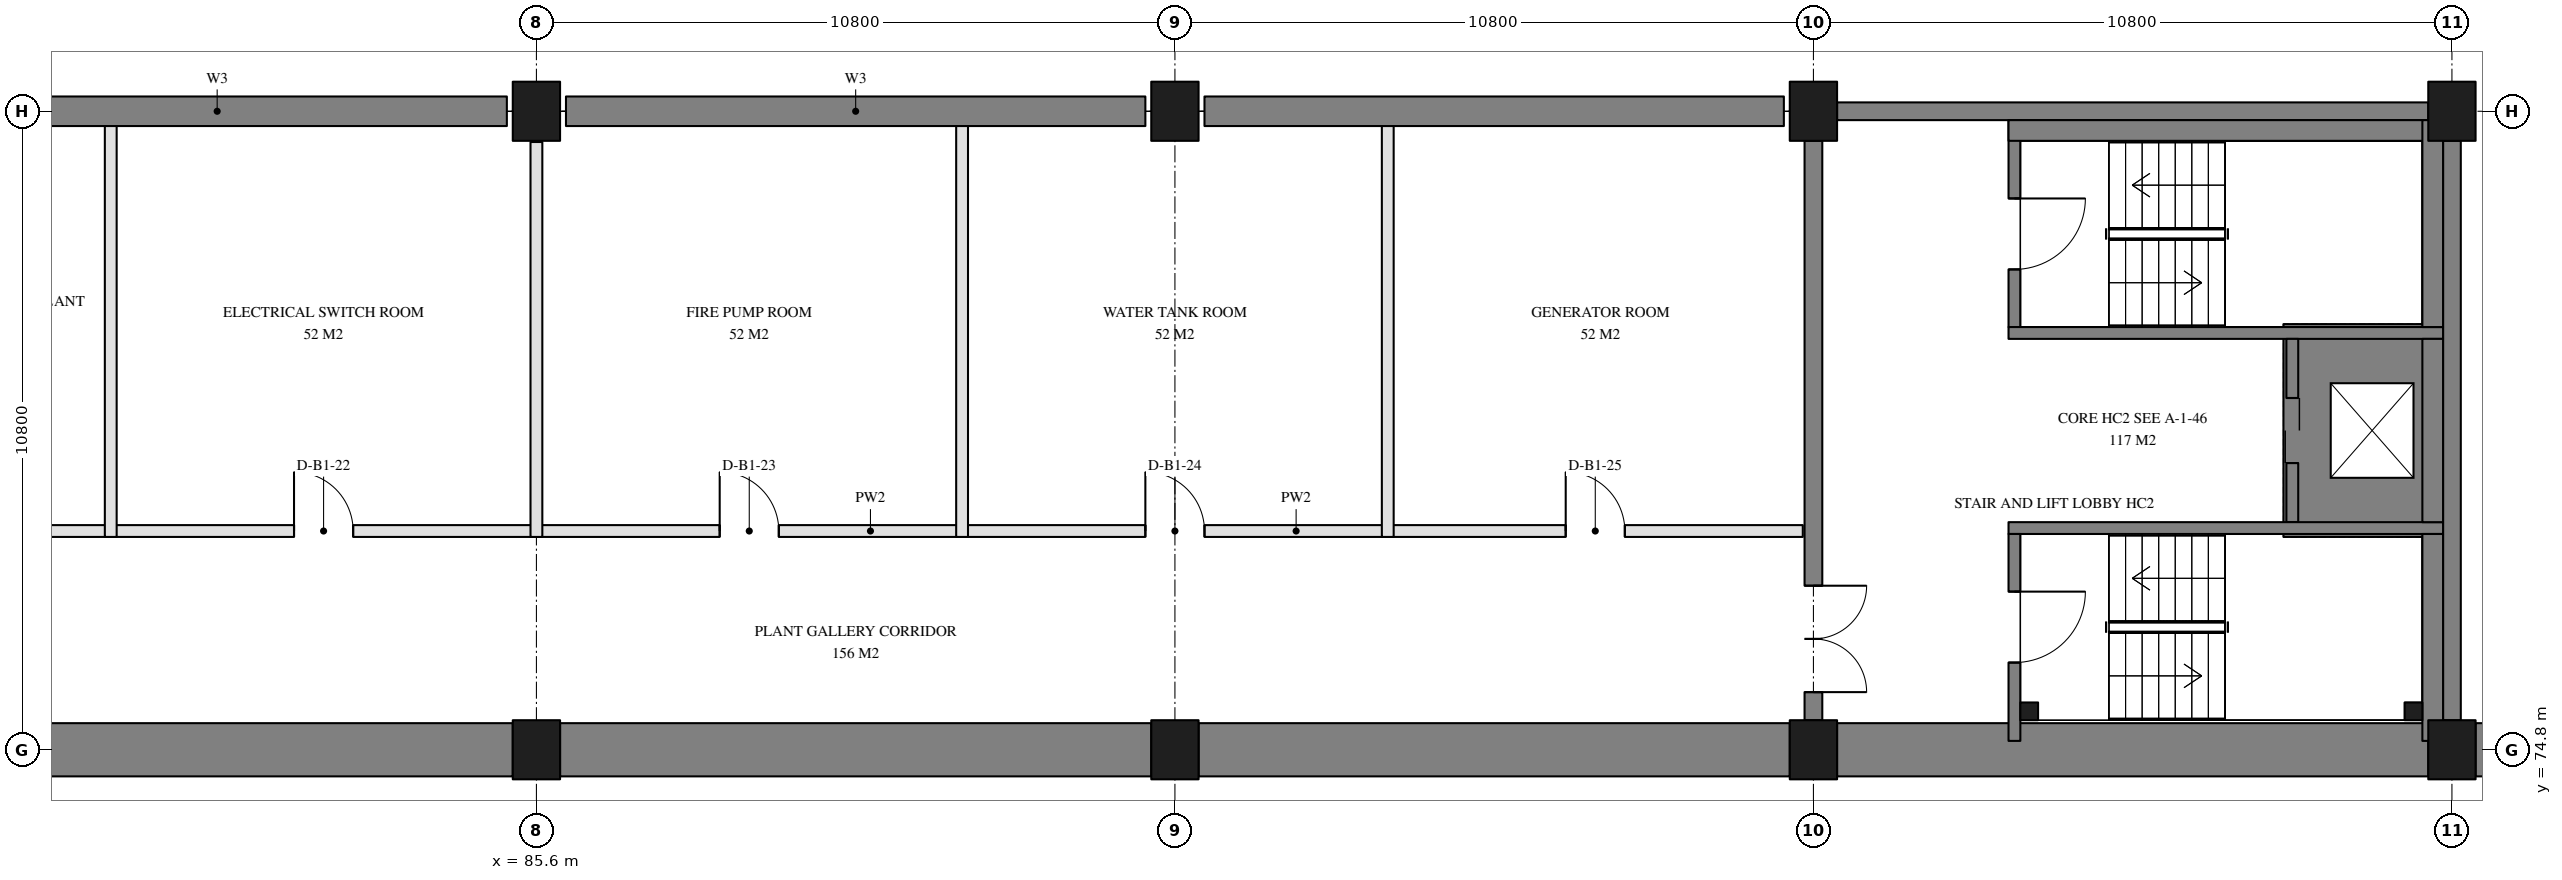
"""IFC4 building model, lengths in metres.
Left out: names, types, materials, properties, quantities, classifications, styles, units other than length and angle.
Written with IfcOpenShell. Run it as: python <this file> out.ifc"""

import sys

from ifc_helpers import new_model, si_unit, direction, frame, frame_2d, origin, origin_2d, place, context, subcontext, project, spatial, polyline, rectangle, outline, extrude, element, fill, save


model = new_model("IFC4")
c1 = context("Model", 3, precision=1e-05, world=origin(), true_north=direction((0.0, 1.0)))
c2 = subcontext(c1, "Body", "Model", "MODEL_VIEW")
j1 = project(units=[si_unit("LENGTHUNIT", "METRE"), si_unit("PLANEANGLEUNIT", "RADIAN")], contexts=[c1])
p1 = place(None, origin())
s1 = spatial("IfcSite", under=j1, at=p1, CompositionType="ELEMENT")
p2 = place(p1, origin())
s2 = spatial("IfcBuilding", under=s1, at=p2, CompositionType="ELEMENT")
p3 = place(p2, frame((0.0, 0.0, -5.4)))
s3 = spatial("IfcBuildingStorey", under=s2, at=p3, CompositionType="ELEMENT", Elevation=-5.4)
p4 = place(p3, frame((85.6, 74.8, 0.0), z_axis=(0.0, 0.0, 1.0), x_axis=(1.0, 0.0, 0.0)))
e1 = element("IfcColumn", 1, at=p4, inside=s3, PredefinedType="COLUMN", context=c2, shape_type="SweptSolid", body=[
    extrude(rectangle(XDim=0.8, YDim=1.0, at=origin_2d()), origin(), (0.0, 0.0, 1.0), 5.4),
])
p5 = place(p3, frame((85.6, 85.6, -0.4), z_axis=(0.0, 0.0, 1.0), x_axis=(1.0, 0.0, 0.0)))
e2 = element("IfcColumn", 2, at=p5, inside=s3, PredefinedType="COLUMN", context=c2, shape_type="SweptSolid", body=[
    extrude(rectangle(XDim=0.8, YDim=1.0, at=origin_2d()), origin(), (0.0, 0.0, 1.0), 5.8),
])
p6 = place(p3, frame((96.4, 74.8, 0.0), z_axis=(0.0, 0.0, 1.0), x_axis=(1.0, 0.0, 0.0)))
e3 = element("IfcColumn", 3, at=p6, inside=s3, PredefinedType="COLUMN", context=c2, shape_type="SweptSolid", body=[
    extrude(rectangle(XDim=0.8, YDim=1.0, at=origin_2d()), origin(), (0.0, 0.0, 1.0), 5.4),
])
p7 = place(p3, frame((96.4, 85.6, -0.4), z_axis=(0.0, 0.0, 1.0), x_axis=(1.0, 0.0, 0.0)))
e4 = element("IfcColumn", 4, at=p7, inside=s3, PredefinedType="COLUMN", context=c2, shape_type="SweptSolid", body=[
    extrude(rectangle(XDim=0.8, YDim=1.0, at=origin_2d()), origin(), (0.0, 0.0, 1.0), 5.8),
])
p8 = place(p3, frame((107.2, 74.8, 0.0), z_axis=(0.0, 0.0, 1.0), x_axis=(1.0, 0.0, 0.0)))
e5 = element("IfcColumn", 5, at=p8, inside=s3, PredefinedType="COLUMN", context=c2, shape_type="SweptSolid", body=[
    extrude(rectangle(XDim=0.8, YDim=1.0, at=origin_2d()), origin(), (0.0, 0.0, 1.0), 5.4),
])
p9 = place(p3, frame((107.2, 85.6, -0.4), z_axis=(0.0, 0.0, 1.0), x_axis=(1.0, 0.0, 0.0)))
e6 = element("IfcColumn", 6, at=p9, inside=s3, PredefinedType="COLUMN", context=c2, shape_type="SweptSolid", body=[
    extrude(rectangle(XDim=0.8, YDim=1.0, at=origin_2d()), origin(), (0.0, 0.0, 1.0), 5.8),
])
p10 = place(p3, frame((118.0, 74.8, 0.0), z_axis=(0.0, 0.0, 1.0), x_axis=(1.0, 0.0, 0.0)))
e7 = element("IfcColumn", 7, at=p10, inside=s3, PredefinedType="COLUMN", context=c2, shape_type="SweptSolid", body=[
    extrude(rectangle(XDim=0.8, YDim=1.0, at=origin_2d()), origin(), (0.0, 0.0, 1.0), 5.4),
])
p11 = place(p3, frame((118.0, 85.6, -0.4), z_axis=(0.0, 0.0, 1.0), x_axis=(1.0, 0.0, 0.0)))
e8 = element("IfcColumn", 8, at=p11, inside=s3, PredefinedType="COLUMN", context=c2, shape_type="SweptSolid", body=[
    extrude(rectangle(XDim=0.8, YDim=1.0, at=origin_2d()), origin(), (0.0, 0.0, 1.0), 5.8),
])
p12 = place(p3, frame((0.0, 0.0, -1.4)))
e9 = element("IfcWall", 9, at=p12, inside=s3, PredefinedType="SOLIDWALL", context=c2, shape_type="SweptSolid", body=[
    extrude(outline(polyline([(115.15, 82.0), (115.15, 78.4), (117.75, 78.4), (117.75, 82.0), (115.15, 82.0)]), holes=[polyline([(115.4, 78.65), (117.5, 78.65), (117.5, 81.75), (115.4, 81.75), (115.4, 78.65)])]), origin(), (0.0, 0.0, 1.0), 1.4),
])
p13 = place(p3, frame((183.25, 74.8, 0.0), z_axis=(0.0, 0.0, 1.0), x_axis=(-1.0, 0.0, 0.0)))
e10 = element("IfcWall", 10, at=p13, inside=s3, PredefinedType="SOLIDWALL", context=c2, shape_type="SweptSolid", body=[
    extrude(rectangle(XDim=64.85, YDim=0.9, at=frame_2d((32.425, 0.0))), origin(), (0.0, 0.0, 1.0), 4.8),
])
for number, where, z_axis, x_axis in (
    (11, (117.6, 74.8, 0.0), (0.0, 0.0, 1.0), (-1.0, 0.0, 0.0)),
    (12, (106.8, 74.8, 0.0), (0.0, 0.0, 1.0), (-1.0, 0.0, 0.0)),
    (13, (96.0, 74.8, 0.0), (0.0, 0.0, 1.0), (-1.0, 0.0, 0.0)),
    (14, (85.2, 74.8, 0.0), (0.0, 0.0, 1.0), (-1.0, 0.0, 0.0)),
):
    element("IfcWall", number, at=place(p3, frame(where, z_axis=z_axis, x_axis=x_axis)), inside=s3, PredefinedType="SOLIDWALL", context=c2, shape_type="SweptSolid", body=[
        extrude(rectangle(XDim=10.0, YDim=0.9, at=frame_2d((5.0, 0.0))), origin(), (0.0, 0.0, 1.0), 4.8),
    ])
p14 = place(p3, frame((118.0, 75.3, 0.0), z_axis=(0.0, 0.0, 1.0), x_axis=(0.0, 1.0, 0.0)))
e15 = element("IfcWall", 15, at=p14, inside=s3, PredefinedType="SOLIDWALL", context=c2, shape_type="SweptSolid", body=[
    extrude(rectangle(XDim=9.8, YDim=0.3, at=frame_2d((4.9, 0.0))), origin(), (0.0, 0.0, 1.0), 5.4),
])
p15 = place(p3, frame((117.6, 85.6, 0.0), z_axis=(0.0, 0.0, 1.0), x_axis=(-1.0, 0.0, 0.0)))
e16 = element("IfcWall", 16, at=p15, inside=s3, PredefinedType="SOLIDWALL", context=c2, shape_type="SweptSolid", body=[
    extrude(rectangle(XDim=10.0, YDim=0.3, at=frame_2d((5.0, 0.0))), origin(), (0.0, 0.0, 1.0), 5.4),
])
p16 = place(p3, frame((107.2, 85.1, 0.0), z_axis=(0.0, 0.0, 1.0), x_axis=(0.0, -1.0, 0.0)))
e17 = element("IfcWall", 17, at=p16, inside=s3, PredefinedType="SOLIDWALL", context=c2, shape_type="SweptSolid", body=[
    extrude(rectangle(XDim=9.8, YDim=0.3, at=frame_2d((4.9, 0.0))), origin(), (0.0, 0.0, 1.0), 5.4),
])
p17 = place(p16, frame((7.525, 0.0, 0.0)))
e18 = element("IfcOpeningElement", 18, at=p17, cuts=e17, PredefinedType="OPENING", context=c2, shape_type="SweptSolid", body=[
    extrude(rectangle(XDim=1.8, YDim=2.1, at=frame_2d((0.9, 1.05))), frame((0.0, 0.16, 0.0), z_axis=(0.0, -1.0, 0.0), x_axis=(1.0, 0.0, 0.0)), (0.0, 0.0, 1.0), 0.32),
])
p18 = place(p3, frame((75.3, 85.6, 0.0), z_axis=(0.0, 0.0, 1.0), x_axis=(1.0, 0.0, 0.0)))
e19 = element("IfcWall", 19, at=p18, inside=s3, PredefinedType="SOLIDWALL", context=c2, shape_type="SweptSolid", body=[
    extrude(rectangle(XDim=9.8, YDim=0.5, at=frame_2d((4.9, 0.0))), origin(), (0.0, 0.0, 1.0), 3.9),
])
p19 = place(p3, frame((86.1, 85.6, 0.0), z_axis=(0.0, 0.0, 1.0), x_axis=(1.0, 0.0, 0.0)))
e20 = element("IfcWall", 20, at=p19, inside=s3, PredefinedType="SOLIDWALL", context=c2, shape_type="SweptSolid", body=[
    extrude(rectangle(XDim=9.8, YDim=0.5, at=frame_2d((4.9, 0.0))), origin(), (0.0, 0.0, 1.0), 3.9),
])
p20 = place(p3, frame((96.9, 85.6, 0.0), z_axis=(0.0, 0.0, 1.0), x_axis=(1.0, 0.0, 0.0)))
e21 = element("IfcWall", 21, at=p20, inside=s3, PredefinedType="SOLIDWALL", context=c2, shape_type="SweptSolid", body=[
    extrude(rectangle(XDim=9.8, YDim=0.5, at=frame_2d((4.9, 0.0))), origin(), (0.0, 0.0, 1.0), 3.9),
])
p21 = place(p3, frame((110.6, 85.45, 0.0), z_axis=(0.0, 0.0, 1.0), x_axis=(0.0, -1.0, 0.0)))
e22 = element("IfcWall", 22, at=p21, inside=s3, PredefinedType="SOLIDWALL", context=c2, shape_type="SweptSolid", body=[
    extrude(rectangle(XDim=3.5, YDim=0.2, at=frame_2d((1.75, 0.0))), origin(), (0.0, 0.0, 1.0), 4.8),
])
p22 = place(p21, frame((1.325, 0.0, 0.0)))
e23 = element("IfcOpeningElement", 23, at=p22, cuts=e22, PredefinedType="OPENING", context=c2, shape_type="SweptSolid", body=[
    extrude(rectangle(XDim=1.2, YDim=2.1, at=frame_2d((0.6, 1.05))), frame((0.0, 0.11, 0.0), z_axis=(0.0, -1.0, 0.0), x_axis=(1.0, 0.0, 0.0)), (0.0, 0.0, 1.0), 0.22),
])
p23 = place(p3, frame((110.5, 81.85, 0.0), z_axis=(0.0, 0.0, 1.0), x_axis=(1.0, 0.0, 0.0)))
e24 = element("IfcWall", 24, at=p23, inside=s3, PredefinedType="SOLIDWALL", context=c2, shape_type="SweptSolid", body=[
    extrude(rectangle(XDim=7.35, YDim=0.2, at=frame_2d((3.675, 0.0))), origin(), (0.0, 0.0, 1.0), 4.8),
])
p24 = place(p3, frame((115.3, 81.75, 0.0), z_axis=(0.0, 0.0, 1.0), x_axis=(0.0, -1.0, 0.0)))
e25 = element("IfcWall", 25, at=p24, inside=s3, PredefinedType="SOLIDWALL", context=c2, shape_type="SweptSolid", body=[
    extrude(rectangle(XDim=3.1, YDim=0.2, at=frame_2d((1.55, 0.0))), origin(), (0.0, 0.0, 1.0), 4.8),
])
p25 = place(p24, frame((1.0, 0.0, 0.0)))
e26 = element("IfcOpeningElement", 26, at=p25, cuts=e25, PredefinedType="OPENING", context=c2, shape_type="SweptSolid", body=[
    extrude(rectangle(XDim=1.1, YDim=2.1, at=frame_2d((0.55, 1.05))), frame((0.0, 0.11, 0.0), z_axis=(0.0, -1.0, 0.0), x_axis=(1.0, 0.0, 0.0)), (0.0, 0.0, 1.0), 0.22),
])
p26 = place(p3, frame((110.5, 78.55, 0.0), z_axis=(0.0, 0.0, 1.0), x_axis=(1.0, 0.0, 0.0)))
e27 = element("IfcWall", 27, at=p26, inside=s3, PredefinedType="SOLIDWALL", context=c2, shape_type="SweptSolid", body=[
    extrude(rectangle(XDim=7.35, YDim=0.2, at=frame_2d((3.675, 0.0))), origin(), (0.0, 0.0, 1.0), 4.8),
])
p27 = place(p3, frame((110.6, 78.45, 0.0), z_axis=(0.0, 0.0, 1.0), x_axis=(0.0, -1.0, 0.0)))
e28 = element("IfcWall", 28, at=p27, inside=s3, PredefinedType="SOLIDWALL", context=c2, shape_type="SweptSolid", body=[
    extrude(rectangle(XDim=3.5, YDim=0.2, at=frame_2d((1.75, 0.0))), origin(), (0.0, 0.0, 1.0), 4.8),
])
p28 = place(p27, frame((0.975, 0.0, 0.0)))
e29 = element("IfcOpeningElement", 29, at=p28, cuts=e28, PredefinedType="OPENING", context=c2, shape_type="SweptSolid", body=[
    extrude(rectangle(XDim=1.2, YDim=2.1, at=frame_2d((0.6, 1.05))), frame((0.0, 0.11, 0.0), z_axis=(0.0, -1.0, 0.0), x_axis=(1.0, 0.0, 0.0)), (0.0, 0.0, 1.0), 0.22),
])
p29 = place(p3, frame((110.5, 85.275, 0.0), z_axis=(0.0, 0.0, 1.0), x_axis=(1.0, 0.0, 0.0)))
e30 = element("IfcWall", 30, at=p29, inside=s3, PredefinedType="SOLIDWALL", context=c2, shape_type="SweptSolid", body=[
    extrude(rectangle(XDim=7.35, YDim=0.35, at=frame_2d((3.675, 0.0))), origin(), (0.0, 0.0, 1.0), 4.8),
])
for number, where, z_axis, x_axis in (
    (31, (117.675, 85.45, 0.0), (0.0, 0.0, 1.0), (0.0, -1.0, 0.0)),
    (32, (117.675, 78.45, 0.0), (0.0, 0.0, 1.0), (0.0, -1.0, 0.0)),
):
    element("IfcWall", number, at=place(p3, frame(where, z_axis=z_axis, x_axis=x_axis)), inside=s3, PredefinedType="SOLIDWALL", context=c2, shape_type="SweptSolid", body=[
        extrude(rectangle(XDim=3.5, YDim=0.35, at=frame_2d((1.75, 0.0))), origin(), (0.0, 0.0, 1.0), 4.8),
    ])
p30 = place(p3, frame((117.675, 81.75, 0.0), z_axis=(0.0, 0.0, 1.0), x_axis=(0.0, -1.0, 0.0)))
e33 = element("IfcWall", 33, at=p30, inside=s3, PredefinedType="SOLIDWALL", context=c2, shape_type="SweptSolid", body=[
    extrude(rectangle(XDim=3.1, YDim=0.35, at=frame_2d((1.55, 0.0))), origin(), (0.0, 0.0, 1.0), 4.8),
])
p31 = place(p3, frame((117.35, 75.45, 0.0), z_axis=(0.0, 0.0, 1.0), x_axis=(1.0, 0.0, 0.0)))
e34 = element("IfcColumn", 34, at=p31, inside=s3, PredefinedType="COLUMN", context=c2, shape_type="SweptSolid", body=[
    extrude(rectangle(XDim=0.3, YDim=0.3, at=origin_2d()), origin(), (0.0, 0.0, 1.0), 3.85),
])
p32 = place(p3, frame((110.85, 75.45, 0.0), z_axis=(0.0, 0.0, 1.0), x_axis=(1.0, 0.0, 0.0)))
e35 = element("IfcColumn", 35, at=p32, inside=s3, PredefinedType="COLUMN", context=c2, shape_type="SweptSolid", body=[
    extrude(rectangle(XDim=0.3, YDim=0.3, at=origin_2d()), origin(), (0.0, 0.0, 1.0), 2.5),
])
p33 = place(p3, frame((85.6, 78.5, 0.0), z_axis=(0.0, 0.0, 1.0), x_axis=(1.0, 0.0, 0.0)))
e36 = element("IfcWall", 36, at=p33, inside=s3, PredefinedType="PARTITIONING", context=c2, shape_type="SweptSolid", body=[
    extrude(rectangle(XDim=7.2, YDim=0.2, at=frame_2d((3.6, 0.0))), origin(), (0.0, 0.0, 1.0), 3.8),
])
p34 = place(p33, frame((3.1, 0.0, 0.0)))
e37 = element("IfcOpeningElement", 37, at=p34, cuts=e36, PredefinedType="OPENING", context=c2, shape_type="SweptSolid", body=[
    extrude(rectangle(XDim=1.0, YDim=2.1, at=frame_2d((0.5, 1.05))), frame((0.0, 0.11, 0.0), z_axis=(0.0, -1.0, 0.0), x_axis=(1.0, 0.0, 0.0)), (0.0, 0.0, 1.0), 0.22),
])
p35 = place(p3, frame((92.8, 78.5, 0.0), z_axis=(0.0, 0.0, 1.0), x_axis=(1.0, 0.0, 0.0)))
e38 = element("IfcWall", 38, at=p35, inside=s3, PredefinedType="PARTITIONING", context=c2, shape_type="SweptSolid", body=[
    extrude(rectangle(XDim=7.2, YDim=0.2, at=frame_2d((3.6, 0.0))), origin(), (0.0, 0.0, 1.0), 3.8),
])
p36 = place(p35, frame((3.1, 0.0, 0.0)))
e39 = element("IfcOpeningElement", 39, at=p36, cuts=e38, PredefinedType="OPENING", context=c2, shape_type="SweptSolid", body=[
    extrude(rectangle(XDim=1.0, YDim=2.1, at=frame_2d((0.5, 1.05))), frame((0.0, 0.11, 0.0), z_axis=(0.0, -1.0, 0.0), x_axis=(1.0, 0.0, 0.0)), (0.0, 0.0, 1.0), 0.22),
])
p37 = place(p3, frame((78.4, 78.5, 0.0), z_axis=(0.0, 0.0, 1.0), x_axis=(1.0, 0.0, 0.0)))
e40 = element("IfcWall", 40, at=p37, inside=s3, PredefinedType="PARTITIONING", context=c2, shape_type="SweptSolid", body=[
    extrude(rectangle(XDim=7.2, YDim=0.2, at=frame_2d((3.6, 0.0))), origin(), (0.0, 0.0, 1.0), 3.8),
])
p38 = place(p37, frame((3.1, 0.0, 0.0)))
e41 = element("IfcOpeningElement", 41, at=p38, cuts=e40, PredefinedType="OPENING", context=c2, shape_type="SweptSolid", body=[
    extrude(rectangle(XDim=1.0, YDim=2.1, at=frame_2d((0.5, 1.05))), frame((0.0, 0.11, 0.0), z_axis=(0.0, -1.0, 0.0), x_axis=(1.0, 0.0, 0.0)), (0.0, 0.0, 1.0), 0.22),
])
p39 = place(p3, frame((71.2, 78.5, 0.0), z_axis=(0.0, 0.0, 1.0), x_axis=(1.0, 0.0, 0.0)))
e42 = element("IfcWall", 42, at=p39, inside=s3, PredefinedType="PARTITIONING", context=c2, shape_type="SweptSolid", body=[
    extrude(rectangle(XDim=7.2, YDim=0.2, at=frame_2d((3.6, 0.0))), origin(), (0.0, 0.0, 1.0), 3.8),
])
p40 = place(p39, frame((3.1, 0.0, 0.0)))
e43 = element("IfcOpeningElement", 43, at=p40, cuts=e42, PredefinedType="OPENING", context=c2, shape_type="SweptSolid", body=[
    extrude(rectangle(XDim=1.0, YDim=2.1, at=frame_2d((0.5, 1.05))), frame((0.0, 0.11, 0.0), z_axis=(0.0, -1.0, 0.0), x_axis=(1.0, 0.0, 0.0)), (0.0, 0.0, 1.0), 0.22),
])
p41 = place(p3, frame((100.0, 78.5, 0.0), z_axis=(0.0, 0.0, 1.0), x_axis=(1.0, 0.0, 0.0)))
e44 = element("IfcWall", 44, at=p41, inside=s3, PredefinedType="PARTITIONING", context=c2, shape_type="SweptSolid", body=[
    extrude(rectangle(XDim=7.02, YDim=0.2, at=frame_2d((3.51, 0.0))), origin(), (0.0, 0.0, 1.0), 4.8),
])
p42 = place(p41, frame((3.01, 0.0, 0.0)))
e45 = element("IfcOpeningElement", 45, at=p42, cuts=e44, PredefinedType="OPENING", context=c2, shape_type="SweptSolid", body=[
    extrude(rectangle(XDim=1.0, YDim=2.1, at=frame_2d((0.5, 1.05))), frame((0.0, 0.11, 0.0), z_axis=(0.0, -1.0, 0.0), x_axis=(1.0, 0.0, 0.0)), (0.0, 0.0, 1.0), 0.22),
])
p43 = place(p3, frame((78.4, 78.4, 0.0), z_axis=(0.0, 0.0, 1.0), x_axis=(0.0, 1.0, 0.0)))
e46 = element("IfcWall", 46, at=p43, inside=s3, PredefinedType="PARTITIONING", context=c2, shape_type="SweptSolid", body=[
    extrude(rectangle(XDim=7.2, YDim=0.2, at=frame_2d((3.6, 0.0))), origin(), (0.0, 0.0, 1.0), 3.9),
])
p44 = place(p3, frame((85.6, 78.4, 0.0), z_axis=(0.0, 0.0, 1.0), x_axis=(0.0, 1.0, 0.0)))
e47 = element("IfcWall", 47, at=p44, inside=s3, PredefinedType="PARTITIONING", context=c2, shape_type="SweptSolid", body=[
    extrude(rectangle(XDim=6.68, YDim=0.2, at=frame_2d((3.34, 0.0))), origin(), (0.0, 0.0, 1.0), 3.8),
])
for number, where, z_axis, x_axis in (
    (48, (92.8, 78.4, 0.0), (0.0, 0.0, 1.0), (0.0, 1.0, 0.0)),
    (49, (100.0, 78.4, 0.0), (0.0, 0.0, 1.0), (0.0, 1.0, 0.0)),
):
    element("IfcWall", number, at=place(p3, frame(where, z_axis=z_axis, x_axis=x_axis)), inside=s3, PredefinedType="PARTITIONING", context=c2, shape_type="SweptSolid", body=[
        extrude(rectangle(XDim=7.2, YDim=0.2, at=frame_2d((3.6, 0.0))), origin(), (0.0, 0.0, 1.0), 3.9),
    ])
p45 = place(p25, frame((1.1, 0.0, 0.0), z_axis=(0.0, 0.0, 1.0), x_axis=(-1.0, 0.0, 0.0)))
e50 = element("IfcDoor", 50, at=p45, inside=s3, OperationType="DOUBLE_DOOR_SLIDING", PredefinedType="DOOR", context=c2, shape_type="SweptSolid", body=[
    extrude(rectangle(XDim=1.1, YDim=2.1, at=frame_2d((0.55, 1.05))), frame((0.0, 0.025, 0.0), z_axis=(0.0, -1.0, 0.0), x_axis=(1.0, 0.0, 0.0)), (0.0, 0.0, 1.0), 0.05),
])
fill(e26, e50)
p46 = place(p22, frame((1.2, 0.0, 0.0), z_axis=(0.0, 0.0, 1.0), x_axis=(-1.0, 0.0, 0.0)))
e51 = element("IfcDoor", 51, at=p46, inside=s3, OperationType="SINGLE_SWING_LEFT", PredefinedType="DOOR", context=c2, shape_type="SweptSolid", body=[
    extrude(rectangle(XDim=1.2, YDim=2.1, at=frame_2d((0.6, 1.05))), frame((0.0, 0.025, 0.0), z_axis=(0.0, -1.0, 0.0), x_axis=(1.0, 0.0, 0.0)), (0.0, 0.0, 1.0), 0.05),
])
fill(e23, e51)
p47 = place(p28, frame((1.2, 0.0, 0.0), z_axis=(0.0, 0.0, 1.0), x_axis=(-1.0, 0.0, 0.0)))
e52 = element("IfcDoor", 52, at=p47, inside=s3, OperationType="SINGLE_SWING_RIGHT", PredefinedType="DOOR", context=c2, shape_type="SweptSolid", body=[
    extrude(rectangle(XDim=1.2, YDim=2.1, at=frame_2d((0.6, 1.05))), frame((0.0, 0.025, 0.0), z_axis=(0.0, -1.0, 0.0), x_axis=(1.0, 0.0, 0.0)), (0.0, 0.0, 1.0), 0.05),
])
fill(e29, e52)
p48 = place(p17, frame((1.8, 0.0, 0.0), z_axis=(0.0, 0.0, 1.0), x_axis=(-1.0, 0.0, 0.0)))
e53 = element("IfcDoor", 53, at=p48, inside=s3, OperationType="DOUBLE_DOOR_DOUBLE_SWING", PredefinedType="DOOR", context=c2, shape_type="SweptSolid", body=[
    extrude(rectangle(XDim=1.8, YDim=2.1, at=frame_2d((0.9, 1.05))), frame((0.0, 0.025, 0.0), z_axis=(0.0, -1.0, 0.0), x_axis=(1.0, 0.0, 0.0)), (0.0, 0.0, 1.0), 0.05),
])
fill(e18, e53)
p49 = place(p38, origin())
e54 = element("IfcDoor", 54, at=p49, inside=s3, OperationType="SINGLE_SWING_LEFT", PredefinedType="DOOR", context=c2, shape_type="SweptSolid", body=[
    extrude(rectangle(XDim=1.0, YDim=2.1, at=frame_2d((0.5, 1.05))), frame((0.0, 0.025, 0.0), z_axis=(0.0, -1.0, 0.0), x_axis=(1.0, 0.0, 0.0)), (0.0, 0.0, 1.0), 0.05),
])
fill(e41, e54)
p50 = place(p34, origin())
e55 = element("IfcDoor", 55, at=p50, inside=s3, OperationType="SINGLE_SWING_LEFT", PredefinedType="DOOR", context=c2, shape_type="SweptSolid", body=[
    extrude(rectangle(XDim=1.0, YDim=2.1, at=frame_2d((0.5, 1.05))), frame((0.0, 0.025, 0.0), z_axis=(0.0, -1.0, 0.0), x_axis=(1.0, 0.0, 0.0)), (0.0, 0.0, 1.0), 0.05),
])
fill(e37, e55)
p51 = place(p36, origin())
e56 = element("IfcDoor", 56, at=p51, inside=s3, OperationType="SINGLE_SWING_RIGHT", PredefinedType="DOOR", context=c2, shape_type="SweptSolid", body=[
    extrude(rectangle(XDim=1.0, YDim=2.1, at=frame_2d((0.5, 1.05))), frame((0.0, 0.025, 0.0), z_axis=(0.0, -1.0, 0.0), x_axis=(1.0, 0.0, 0.0)), (0.0, 0.0, 1.0), 0.05),
])
fill(e39, e56)
p52 = place(p42, origin())
e57 = element("IfcDoor", 57, at=p52, inside=s3, OperationType="SINGLE_SWING_LEFT", PredefinedType="DOOR", context=c2, shape_type="SweptSolid", body=[
    extrude(rectangle(XDim=1.0, YDim=2.1, at=frame_2d((0.5, 1.05))), frame((0.0, 0.025, 0.0), z_axis=(0.0, -1.0, 0.0), x_axis=(1.0, 0.0, 0.0)), (0.0, 0.0, 1.0), 0.05),
])
fill(e45, e57)
save(model, sys.argv[1])
